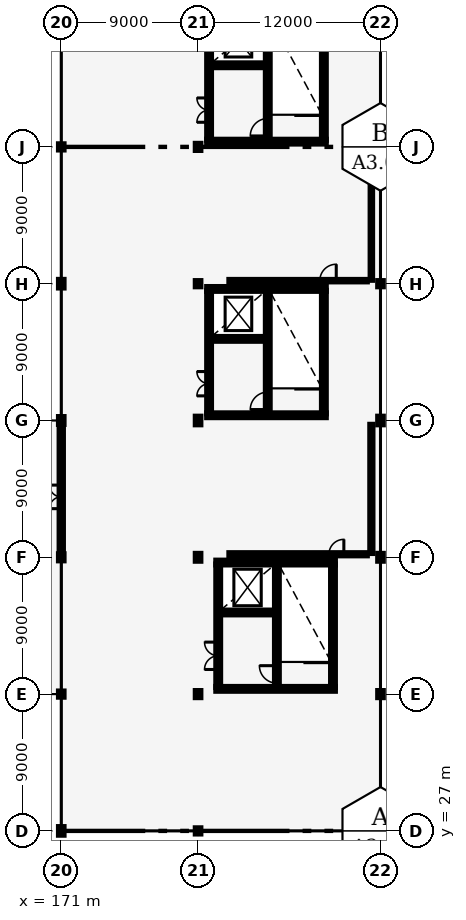
"""IFC4 building model, lengths in metres.
Left out: names, types, materials, properties, quantities, classifications, styles, units other than length and angle.
Written with IfcOpenShell. Run it as: python <this file> out.ifc"""

import sys

from ifc_helpers import new_model, si_unit, direction, frame, frame_2d, origin, origin_2d, place, context, subcontext, project, spatial, rectangle, i_section, extrude, element, fill, save


model = new_model("IFC4")
c1 = context("Model", 3, precision=1e-05, world=origin(), true_north=direction((0.0, 1.0)))
c2 = subcontext(c1, "Body", "Model", "MODEL_VIEW")
j1 = project(units=[si_unit("LENGTHUNIT", "METRE"), si_unit("PLANEANGLEUNIT", "RADIAN")], contexts=[c1])
p1 = place(None, origin())
s1 = spatial("IfcSite", under=j1, at=p1, CompositionType="ELEMENT")
p2 = place(p1, origin())
s2 = spatial("IfcBuilding", under=s1, at=p2, CompositionType="ELEMENT")
p3 = place(p2, frame((0.0, 0.0, 26.8)))
s3 = spatial("IfcBuildingStorey", under=s2, at=p3, CompositionType="ELEMENT", Elevation=26.8)
p4 = place(p3, frame((171.0, 27.0, 0.0), z_axis=(0.0, 0.0, 1.0), x_axis=(1.0, 0.0, 0.0)))
e1 = element("IfcColumn", 1, at=p4, inside=s3, PredefinedType="COLUMN", context=c2, shape_type="SweptSolid", body=[
    extrude(i_section(OverallWidth=0.3, OverallDepth=0.5, WebThickness=0.014, FlangeThickness=0.028, FilletRadius=0.027, at=origin_2d()), origin(), (0.0, 0.0, 1.0), 3.0),
])
p5 = place(p3, frame((171.0, 36.0, 0.0), z_axis=(0.0, 0.0, 1.0), x_axis=(1.0, 0.0, 0.0)))
e2 = element("IfcColumn", 2, at=p5, inside=s3, PredefinedType="COLUMN", context=c2, shape_type="SweptSolid", body=[
    extrude(i_section(OverallWidth=0.3, OverallDepth=0.34, WebThickness=0.012, FlangeThickness=0.021, FilletRadius=0.027, at=origin_2d()), origin(), (0.0, 0.0, 1.0), 3.0),
])
p6 = place(p3, frame((171.0, 45.0, 0.0), z_axis=(0.0, 0.0, 1.0), x_axis=(1.0, 0.0, 0.0)))
e3 = element("IfcColumn", 3, at=p6, inside=s3, PredefinedType="COLUMN", context=c2, shape_type="SweptSolid", body=[
    extrude(i_section(OverallWidth=0.3, OverallDepth=0.4, WebThickness=0.013, FlangeThickness=0.024, FilletRadius=0.027, at=origin_2d()), origin(), (0.0, 0.0, 1.0), 3.0),
])
p7 = place(p3, frame((171.0, 54.0, 0.0), z_axis=(0.0, 0.0, 1.0), x_axis=(1.0, 0.0, 0.0)))
e4 = element("IfcColumn", 4, at=p7, inside=s3, PredefinedType="COLUMN", context=c2, shape_type="SweptSolid", body=[
    extrude(i_section(OverallWidth=0.3, OverallDepth=0.45, WebThickness=0.014, FlangeThickness=0.026, FilletRadius=0.027, at=origin_2d()), origin(), (0.0, 0.0, 1.0), 3.0),
])
p8 = place(p3, frame((171.0, 63.0, 0.0), z_axis=(0.0, 0.0, 1.0), x_axis=(1.0, 0.0, 0.0)))
e5 = element("IfcColumn", 5, at=p8, inside=s3, PredefinedType="COLUMN", context=c2, shape_type="SweptSolid", body=[
    extrude(i_section(OverallWidth=0.3, OverallDepth=0.5, WebThickness=0.014, FlangeThickness=0.028, FilletRadius=0.027, at=origin_2d()), origin(), (0.0, 0.0, 1.0), 3.0),
])
for number, where, z_axis, x_axis in (
    (6, (171.0, 72.0, 0.0), (0.0, 0.0, 1.0), (1.0, 0.0, 0.0)),
    (7, (180.0, 27.0, 0.0), (0.0, 0.0, 1.0), (1.0, 0.0, 0.0)),
):
    element("IfcColumn", number, at=place(p3, frame(where, z_axis=z_axis, x_axis=x_axis)), inside=s3, PredefinedType="COLUMN", context=c2, shape_type="SweptSolid", body=[
        extrude(i_section(OverallWidth=0.3, OverallDepth=0.34, WebThickness=0.012, FlangeThickness=0.021, FilletRadius=0.027, at=origin_2d()), origin(), (0.0, 0.0, 1.0), 3.0),
    ])
p9 = place(p3, frame((180.0, 36.0, 0.0), z_axis=(0.0, 0.0, 1.0), x_axis=(1.0, 0.0, 0.0)))
e8 = element("IfcColumn", 8, at=p9, inside=s3, PredefinedType="COLUMN", context=c2, shape_type="SweptSolid", body=[
    extrude(i_section(OverallWidth=0.3, OverallDepth=0.4, WebThickness=0.013, FlangeThickness=0.024, FilletRadius=0.027, at=origin_2d()), origin(), (0.0, 0.0, 1.0), 3.0),
])
p10 = place(p3, frame((180.0, 45.0, 0.0), z_axis=(0.0, 0.0, 1.0), x_axis=(1.0, 0.0, 0.0)))
e9 = element("IfcColumn", 9, at=p10, inside=s3, PredefinedType="COLUMN", context=c2, shape_type="SweptSolid", body=[
    extrude(i_section(OverallWidth=0.3, OverallDepth=0.45, WebThickness=0.014, FlangeThickness=0.026, FilletRadius=0.027, at=origin_2d()), origin(), (0.0, 0.0, 1.0), 3.0),
])
p11 = place(p3, frame((180.0, 54.0, 0.0), z_axis=(0.0, 0.0, 1.0), x_axis=(1.0, 0.0, 0.0)))
e10 = element("IfcColumn", 10, at=p11, inside=s3, PredefinedType="COLUMN", context=c2, shape_type="SweptSolid", body=[
    extrude(i_section(OverallWidth=0.3, OverallDepth=0.5, WebThickness=0.014, FlangeThickness=0.028, FilletRadius=0.027, at=origin_2d()), origin(), (0.0, 0.0, 1.0), 3.0),
])
p12 = place(p3, frame((180.0, 63.0, 0.0), z_axis=(0.0, 0.0, 1.0), x_axis=(1.0, 0.0, 0.0)))
e11 = element("IfcColumn", 11, at=p12, inside=s3, PredefinedType="COLUMN", context=c2, shape_type="SweptSolid", body=[
    extrude(i_section(OverallWidth=0.3, OverallDepth=0.34, WebThickness=0.012, FlangeThickness=0.021, FilletRadius=0.027, at=origin_2d()), origin(), (0.0, 0.0, 1.0), 3.0),
])
p13 = place(p3, frame((180.0, 72.0, 0.0), z_axis=(0.0, 0.0, 1.0), x_axis=(1.0, 0.0, 0.0)))
e12 = element("IfcColumn", 12, at=p13, inside=s3, PredefinedType="COLUMN", context=c2, shape_type="SweptSolid", body=[
    extrude(i_section(OverallWidth=0.3, OverallDepth=0.4, WebThickness=0.013, FlangeThickness=0.024, FilletRadius=0.027, at=origin_2d()), origin(), (0.0, 0.0, 1.0), 3.0),
])
p14 = place(p3, frame((192.0, 27.0, 0.0), z_axis=(0.0, 0.0, 1.0), x_axis=(1.0, 0.0, 0.0)))
e13 = element("IfcColumn", 13, at=p14, inside=s3, PredefinedType="COLUMN", context=c2, shape_type="SweptSolid", body=[
    extrude(i_section(OverallWidth=0.3, OverallDepth=0.34, WebThickness=0.012, FlangeThickness=0.021, FilletRadius=0.027, at=origin_2d()), origin(), (0.0, 0.0, 1.0), 3.0),
])
p15 = place(p3, frame((192.0, 36.0, 0.0), z_axis=(0.0, 0.0, 1.0), x_axis=(1.0, 0.0, 0.0)))
e14 = element("IfcColumn", 14, at=p15, inside=s3, PredefinedType="COLUMN", context=c2, shape_type="SweptSolid", body=[
    extrude(i_section(OverallWidth=0.3, OverallDepth=0.4, WebThickness=0.013, FlangeThickness=0.024, FilletRadius=0.027, at=origin_2d()), origin(), (0.0, 0.0, 1.0), 3.0),
])
p16 = place(p3, frame((192.0, 45.0, 0.0), z_axis=(0.0, 0.0, 1.0), x_axis=(1.0, 0.0, 0.0)))
e15 = element("IfcColumn", 15, at=p16, inside=s3, PredefinedType="COLUMN", context=c2, shape_type="SweptSolid", body=[
    extrude(i_section(OverallWidth=0.3, OverallDepth=0.45, WebThickness=0.014, FlangeThickness=0.026, FilletRadius=0.027, at=origin_2d()), origin(), (0.0, 0.0, 1.0), 3.0),
])
p17 = place(p3, frame((192.0, 54.0, 0.0), z_axis=(0.0, 0.0, 1.0), x_axis=(1.0, 0.0, 0.0)))
e16 = element("IfcColumn", 16, at=p17, inside=s3, PredefinedType="COLUMN", context=c2, shape_type="SweptSolid", body=[
    extrude(i_section(OverallWidth=0.3, OverallDepth=0.5, WebThickness=0.014, FlangeThickness=0.028, FilletRadius=0.027, at=origin_2d()), origin(), (0.0, 0.0, 1.0), 3.0),
])
p18 = place(p3, frame((192.0, 63.0, 0.0), z_axis=(0.0, 0.0, 1.0), x_axis=(1.0, 0.0, 0.0)))
e17 = element("IfcColumn", 17, at=p18, inside=s3, PredefinedType="COLUMN", context=c2, shape_type="SweptSolid", body=[
    extrude(i_section(OverallWidth=0.3, OverallDepth=0.34, WebThickness=0.012, FlangeThickness=0.021, FilletRadius=0.027, at=origin_2d()), origin(), (0.0, 0.0, 1.0), 3.0),
])
p19 = place(p3, frame((192.0, 72.0, 0.0), z_axis=(0.0, 0.0, 1.0), x_axis=(1.0, 0.0, 0.0)))
e18 = element("IfcColumn", 18, at=p19, inside=s3, PredefinedType="COLUMN", context=c2, shape_type="SweptSolid", body=[
    extrude(i_section(OverallWidth=0.3, OverallDepth=0.4, WebThickness=0.013, FlangeThickness=0.024, FilletRadius=0.027, at=origin_2d()), origin(), (0.0, 0.0, 1.0), 3.0),
])
p20 = place(p3, frame((171.0, 45.195, 0.0), z_axis=(0.0, 0.0, 1.0), x_axis=(0.0, 1.0, 0.0)))
e19 = element("IfcWall", 19, at=p20, inside=s3, PredefinedType="SOLIDWALL", context=c2, shape_type="SweptSolid", body=[
    extrude(rectangle(XDim=8.585, YDim=0.215, at=frame_2d((4.292, 0.0))), origin(), (0.0, 0.0, 1.0), 2.35),
])
p21 = place(p20, frame((3.005, 0.0, 0.0)))
e20 = element("IfcOpeningElement", 20, at=p21, cuts=e19, PredefinedType="OPENING", context=c2, shape_type="SweptSolid", body=[
    extrude(rectangle(XDim=1.55, YDim=2.15, at=frame_2d((0.775, 1.075))), frame((0.0, 0.117, 0.0), z_axis=(0.0, -1.0, 0.0), x_axis=(1.0, 0.0, 0.0)), (0.0, 0.0, 1.0), 0.235),
])
p22 = place(p3, frame((180.725, 54.47, 0.0), z_axis=(0.0, 0.0, 1.0), x_axis=(0.0, 1.0, 0.0)))
e21 = element("IfcWall", 21, at=p22, inside=s3, PredefinedType="SHEAR", context=c2, shape_type="SweptSolid", body=[
    extrude(rectangle(XDim=8.06, YDim=0.25, at=frame_2d((4.03, 0.0))), origin(), (0.0, 0.0, 1.0), 2.64),
])
p23 = place(p22, frame((1.15, 0.0, 0.0)))
e22 = element("IfcOpeningElement", 22, at=p23, cuts=e21, PredefinedType="OPENING", context=c2, shape_type="SweptSolid", body=[
    extrude(rectangle(XDim=1.6, YDim=2.2, at=frame_2d((0.8, 1.1))), frame((0.0, 0.135, 0.0), z_axis=(0.0, -1.0, 0.0), x_axis=(1.0, 0.0, 0.0)), (0.0, 0.0, 1.0), 0.27),
])
p24 = place(p3, frame((188.275, 54.47, 0.0), z_axis=(0.0, 0.0, 1.0), x_axis=(0.0, 1.0, 0.0)))
e23 = element("IfcWall", 23, at=p24, inside=s3, PredefinedType="SHEAR", context=c2, shape_type="SweptSolid", body=[
    extrude(rectangle(XDim=8.06, YDim=0.25, at=frame_2d((4.03, 0.0))), origin(), (0.0, 0.0, 1.0), 2.64),
])
for number, where, z_axis, x_axis in (
    (24, (180.6, 54.345, 0.0), (0.0, 0.0, 1.0), (1.0, 0.0, 0.0)),
    (25, (180.6, 62.655, 0.0), (0.0, 0.0, 1.0), (1.0, 0.0, 0.0)),
):
    element("IfcWall", number, at=place(p3, frame(where, z_axis=z_axis, x_axis=x_axis)), inside=s3, PredefinedType="SHEAR", context=c2, shape_type="SweptSolid", body=[
        extrude(rectangle(XDim=7.8, YDim=0.25, at=frame_2d((3.9, 0.0))), origin(), (0.0, 0.0, 1.0), 2.64),
    ])
p25 = place(p3, frame((184.585, 54.47, 0.0), z_axis=(0.0, 0.0, 1.0), x_axis=(0.0, 1.0, 0.0)))
e26 = element("IfcWall", 26, at=p25, inside=s3, PredefinedType="SHEAR", context=c2, shape_type="SweptSolid", body=[
    extrude(rectangle(XDim=8.06, YDim=0.25, at=frame_2d((4.03, 0.0))), origin(), (0.0, 0.0, 1.0), 2.64),
])
p26 = place(p25, frame((0.25, 0.0, 0.0)))
e27 = element("IfcOpeningElement", 27, at=p26, cuts=e26, PredefinedType="OPENING", context=c2, shape_type="SweptSolid", body=[
    extrude(rectangle(XDim=1.15, YDim=2.15, at=frame_2d((0.575, 1.075))), frame((0.0, 0.135, 0.0), z_axis=(0.0, -1.0, 0.0), x_axis=(1.0, 0.0, 0.0)), (0.0, 0.0, 1.0), 0.27),
])
p27 = place(p3, frame((180.85, 59.37, 0.0), z_axis=(0.0, 0.0, 1.0), x_axis=(1.0, 0.0, 0.0)))
e28 = element("IfcWall", 28, at=p27, inside=s3, PredefinedType="SHEAR", context=c2, shape_type="SweptSolid", body=[
    extrude(rectangle(XDim=3.61, YDim=0.25, at=frame_2d((1.805, 0.0))), origin(), (0.0, 0.0, 1.0), 2.64),
])
p28 = place(p27, frame((1.0, 0.0, 0.0)))
e29 = element("IfcOpeningElement", 29, at=p28, cuts=e28, PredefinedType="OPENING", context=c2, shape_type="SweptSolid", body=[
    extrude(rectangle(XDim=1.1, YDim=2.1, at=frame_2d((0.55, 1.05))), frame((0.0, 0.135, 0.0), z_axis=(0.0, -1.0, 0.0), x_axis=(1.0, 0.0, 0.0)), (0.0, 0.0, 1.0), 0.27),
])
p29 = place(p3, frame((181.325, 36.47, 0.0), z_axis=(0.0, 0.0, 1.0), x_axis=(0.0, 1.0, 0.0)))
e30 = element("IfcWall", 30, at=p29, inside=s3, PredefinedType="SHEAR", context=c2, shape_type="SweptSolid", body=[
    extrude(rectangle(XDim=8.06, YDim=0.25, at=frame_2d((4.03, 0.0))), origin(), (0.0, 0.0, 1.0), 2.64),
])
p30 = place(p29, frame((1.15, 0.0, 0.0)))
e31 = element("IfcOpeningElement", 31, at=p30, cuts=e30, PredefinedType="OPENING", context=c2, shape_type="SweptSolid", body=[
    extrude(rectangle(XDim=1.8, YDim=2.2, at=frame_2d((0.9, 1.1))), frame((0.0, 0.135, 0.0), z_axis=(0.0, -1.0, 0.0), x_axis=(1.0, 0.0, 0.0)), (0.0, 0.0, 1.0), 0.27),
])
p31 = place(p3, frame((188.875, 36.47, 0.0), z_axis=(0.0, 0.0, 1.0), x_axis=(0.0, 1.0, 0.0)))
e32 = element("IfcWall", 32, at=p31, inside=s3, PredefinedType="SHEAR", context=c2, shape_type="SweptSolid", body=[
    extrude(rectangle(XDim=8.06, YDim=0.25, at=frame_2d((4.03, 0.0))), origin(), (0.0, 0.0, 1.0), 2.64),
])
for number, where, z_axis, x_axis in (
    (33, (181.2, 36.345, 0.0), (0.0, 0.0, 1.0), (1.0, 0.0, 0.0)),
    (34, (181.2, 44.655, 0.0), (0.0, 0.0, 1.0), (1.0, 0.0, 0.0)),
):
    element("IfcWall", number, at=place(p3, frame(where, z_axis=z_axis, x_axis=x_axis)), inside=s3, PredefinedType="SHEAR", context=c2, shape_type="SweptSolid", body=[
        extrude(rectangle(XDim=7.8, YDim=0.25, at=frame_2d((3.9, 0.0))), origin(), (0.0, 0.0, 1.0), 2.64),
    ])
p32 = place(p3, frame((185.185, 36.47, 0.0), z_axis=(0.0, 0.0, 1.0), x_axis=(0.0, 1.0, 0.0)))
e35 = element("IfcWall", 35, at=p32, inside=s3, PredefinedType="SHEAR", context=c2, shape_type="SweptSolid", body=[
    extrude(rectangle(XDim=8.06, YDim=0.25, at=frame_2d((4.03, 0.0))), origin(), (0.0, 0.0, 1.0), 2.64),
])
p33 = place(p32, frame((0.25, 0.0, 0.0)))
e36 = element("IfcOpeningElement", 36, at=p33, cuts=e35, PredefinedType="OPENING", context=c2, shape_type="SweptSolid", body=[
    extrude(rectangle(XDim=1.15, YDim=2.15, at=frame_2d((0.575, 1.075))), frame((0.0, 0.135, 0.0), z_axis=(0.0, -1.0, 0.0), x_axis=(1.0, 0.0, 0.0)), (0.0, 0.0, 1.0), 0.27),
])
p34 = place(p3, frame((181.45, 41.37, 0.0), z_axis=(0.0, 0.0, 1.0), x_axis=(1.0, 0.0, 0.0)))
e37 = element("IfcWall", 37, at=p34, inside=s3, PredefinedType="SHEAR", context=c2, shape_type="SweptSolid", body=[
    extrude(rectangle(XDim=3.61, YDim=0.25, at=frame_2d((1.805, 0.0))), origin(), (0.0, 0.0, 1.0), 2.64),
])
p35 = place(p34, frame((1.0, 0.0, 0.0)))
e38 = element("IfcOpeningElement", 38, at=p35, cuts=e37, PredefinedType="OPENING", context=c2, shape_type="SweptSolid", body=[
    extrude(rectangle(XDim=1.1, YDim=2.1, at=frame_2d((0.55, 1.05))), frame((0.0, 0.135, 0.0), z_axis=(0.0, -1.0, 0.0), x_axis=(1.0, 0.0, 0.0)), (0.0, 0.0, 1.0), 0.27),
])
p36 = place(p3, frame((180.725, 72.47, 0.0), z_axis=(0.0, 0.0, 1.0), x_axis=(0.0, 1.0, 0.0)))
e39 = element("IfcWall", 39, at=p36, inside=s3, PredefinedType="SHEAR", context=c2, shape_type="SweptSolid", body=[
    extrude(rectangle(XDim=8.06, YDim=0.25, at=frame_2d((4.03, 0.0))), origin(), (0.0, 0.0, 1.0), 2.64),
])
p37 = place(p36, frame((1.15, 0.0, 0.0)))
e40 = element("IfcOpeningElement", 40, at=p37, cuts=e39, PredefinedType="OPENING", context=c2, shape_type="SweptSolid", body=[
    extrude(rectangle(XDim=1.6, YDim=2.2, at=frame_2d((0.8, 1.1))), frame((0.0, 0.135, 0.0), z_axis=(0.0, -1.0, 0.0), x_axis=(1.0, 0.0, 0.0)), (0.0, 0.0, 1.0), 0.27),
])
p38 = place(p3, frame((188.275, 72.47, 0.0), z_axis=(0.0, 0.0, 1.0), x_axis=(0.0, 1.0, 0.0)))
e41 = element("IfcWall", 41, at=p38, inside=s3, PredefinedType="SHEAR", context=c2, shape_type="SweptSolid", body=[
    extrude(rectangle(XDim=8.06, YDim=0.25, at=frame_2d((4.03, 0.0))), origin(), (0.0, 0.0, 1.0), 2.64),
])
p39 = place(p3, frame((180.6, 72.345, 0.0), z_axis=(0.0, 0.0, 1.0), x_axis=(1.0, 0.0, 0.0)))
e42 = element("IfcWall", 42, at=p39, inside=s3, PredefinedType="SHEAR", context=c2, shape_type="SweptSolid", body=[
    extrude(rectangle(XDim=7.8, YDim=0.25, at=frame_2d((3.9, 0.0))), origin(), (0.0, 0.0, 1.0), 2.64),
])
p40 = place(p3, frame((184.585, 72.47, 0.0), z_axis=(0.0, 0.0, 1.0), x_axis=(0.0, 1.0, 0.0)))
e43 = element("IfcWall", 43, at=p40, inside=s3, PredefinedType="SHEAR", context=c2, shape_type="SweptSolid", body=[
    extrude(rectangle(XDim=8.06, YDim=0.25, at=frame_2d((4.03, 0.0))), origin(), (0.0, 0.0, 1.0), 2.64),
])
p41 = place(p40, frame((0.25, 0.0, 0.0)))
e44 = element("IfcOpeningElement", 44, at=p41, cuts=e43, PredefinedType="OPENING", context=c2, shape_type="SweptSolid", body=[
    extrude(rectangle(XDim=1.15, YDim=2.15, at=frame_2d((0.575, 1.075))), frame((0.0, 0.135, 0.0), z_axis=(0.0, -1.0, 0.0), x_axis=(1.0, 0.0, 0.0)), (0.0, 0.0, 1.0), 0.27),
])
p42 = place(p3, frame((180.85, 77.37, 0.0), z_axis=(0.0, 0.0, 1.0), x_axis=(1.0, 0.0, 0.0)))
e45 = element("IfcWall", 45, at=p42, inside=s3, PredefinedType="SHEAR", context=c2, shape_type="SweptSolid", body=[
    extrude(rectangle(XDim=3.61, YDim=0.25, at=frame_2d((1.805, 0.0))), origin(), (0.0, 0.0, 1.0), 2.64),
])
p43 = place(p42, frame((1.0, 0.0, 0.0)))
e46 = element("IfcOpeningElement", 46, at=p43, cuts=e45, PredefinedType="OPENING", context=c2, shape_type="SweptSolid", body=[
    extrude(rectangle(XDim=1.1, YDim=2.1, at=frame_2d((0.55, 1.05))), frame((0.0, 0.135, 0.0), z_axis=(0.0, -1.0, 0.0), x_axis=(1.0, 0.0, 0.0)), (0.0, 0.0, 1.0), 0.27),
])
p44 = place(p3, frame((182.06, 63.2, 0.0), z_axis=(0.0, 0.0, 1.0), x_axis=(1.0, 0.0, 0.0)))
e47 = element("IfcWall", 47, at=p44, inside=s3, PredefinedType="PARTITIONING", context=c2, shape_type="SweptSolid", body=[
    extrude(rectangle(XDim=9.04, YDim=0.095, at=frame_2d((4.52, 0.0))), origin(), (0.0, 0.0, 1.0), 2.35),
])
p45 = place(p44, frame((5.95, 0.0, 0.0)))
e48 = element("IfcOpeningElement", 48, at=p45, cuts=e47, PredefinedType="OPENING", context=c2, shape_type="SweptSolid", body=[
    extrude(rectangle(XDim=1.08, YDim=2.18, at=frame_2d((0.54, 1.09))), frame((0.0, 0.057, 0.0), z_axis=(0.0, -1.0, 0.0), x_axis=(1.0, 0.0, 0.0)), (0.0, 0.0, 1.0), 0.115),
])
p46 = place(p3, frame((191.4, 63.257, 0.0), z_axis=(0.0, 0.0, 1.0), x_axis=(0.0, 1.0, 0.0)))
e49 = element("IfcWall", 49, at=p46, inside=s3, PredefinedType="PARTITIONING", context=c2, shape_type="SweptSolid", body=[
    extrude(rectangle(XDim=8.486, YDim=0.095, at=frame_2d((4.243, 0.0))), origin(), (0.0, 0.0, 1.0), 2.35),
])
p47 = place(p3, frame((182.06, 45.2, 0.0), z_axis=(0.0, 0.0, 1.0), x_axis=(1.0, 0.0, 0.0)))
e50 = element("IfcWall", 50, at=p47, inside=s3, PredefinedType="PARTITIONING", context=c2, shape_type="SweptSolid", body=[
    extrude(rectangle(XDim=9.04, YDim=0.14, at=frame_2d((4.52, 0.0))), origin(), (0.0, 0.0, 1.0), 2.35),
])
p48 = place(p47, frame((6.55, 0.0, 0.0)))
e51 = element("IfcOpeningElement", 51, at=p48, cuts=e50, PredefinedType="OPENING", context=c2, shape_type="SweptSolid", body=[
    extrude(rectangle(XDim=0.98, YDim=2.12, at=frame_2d((0.49, 1.06))), frame((0.0, 0.08, 0.0), z_axis=(0.0, -1.0, 0.0), x_axis=(1.0, 0.0, 0.0)), (0.0, 0.0, 1.0), 0.16),
])
p49 = place(p3, frame((191.4, 45.284, 0.0), z_axis=(0.0, 0.0, 1.0), x_axis=(0.0, 1.0, 0.0)))
e52 = element("IfcWall", 52, at=p49, inside=s3, PredefinedType="PARTITIONING", context=c2, shape_type="SweptSolid", body=[
    extrude(rectangle(XDim=8.432, YDim=0.14, at=frame_2d((4.216, 0.0))), origin(), (0.0, 0.0, 1.0), 2.35),
])
p50 = place(p21, origin())
e53 = element("IfcDoor", 53, at=p50, inside=s3, OperationType="DOUBLE_DOOR_SINGLE_SWING", PredefinedType="DOOR", context=c2, shape_type="SweptSolid", body=[
    extrude(rectangle(XDim=1.55, YDim=2.15, at=frame_2d((0.775, 1.075))), frame((0.0, 0.025, 0.0), z_axis=(0.0, -1.0, 0.0), x_axis=(1.0, 0.0, 0.0)), (0.0, 0.0, 1.0), 0.05),
])
fill(e20, e53)
p51 = place(p26, origin())
e54 = element("IfcDoor", 54, at=p51, inside=s3, OperationType="SINGLE_SWING_LEFT", PredefinedType="DOOR", context=c2, shape_type="SweptSolid", body=[
    extrude(rectangle(XDim=1.15, YDim=2.15, at=frame_2d((0.575, 1.075))), frame((0.0, 0.025, 0.0), z_axis=(0.0, -1.0, 0.0), x_axis=(1.0, 0.0, 0.0)), (0.0, 0.0, 1.0), 0.05),
])
fill(e27, e54)
p52 = place(p28, origin())
e55 = element("IfcDoor", 55, at=p52, inside=s3, OperationType="DOUBLE_DOOR_SLIDING", PredefinedType="DOOR", context=c2, shape_type="SweptSolid", body=[
    extrude(rectangle(XDim=1.1, YDim=2.1, at=frame_2d((0.55, 1.05))), frame((0.0, 0.025, 0.0), z_axis=(0.0, -1.0, 0.0), x_axis=(1.0, 0.0, 0.0)), (0.0, 0.0, 1.0), 0.05),
])
fill(e29, e55)
p53 = place(p23, origin())
e56 = element("IfcDoor", 56, at=p53, inside=s3, OperationType="DOUBLE_DOOR_SINGLE_SWING", PredefinedType="DOOR", context=c2, shape_type="SweptSolid", body=[
    extrude(rectangle(XDim=1.6, YDim=2.2, at=frame_2d((0.8, 1.1))), frame((0.0, 0.025, 0.0), z_axis=(0.0, -1.0, 0.0), x_axis=(1.0, 0.0, 0.0)), (0.0, 0.0, 1.0), 0.05),
])
fill(e22, e56)
p54 = place(p33, origin())
e57 = element("IfcDoor", 57, at=p54, inside=s3, OperationType="SINGLE_SWING_RIGHT", PredefinedType="DOOR", context=c2, shape_type="SweptSolid", body=[
    extrude(rectangle(XDim=1.15, YDim=2.15, at=frame_2d((0.575, 1.075))), frame((0.0, 0.025, 0.0), z_axis=(0.0, -1.0, 0.0), x_axis=(1.0, 0.0, 0.0)), (0.0, 0.0, 1.0), 0.05),
])
fill(e36, e57)
p55 = place(p35, origin())
e58 = element("IfcDoor", 58, at=p55, inside=s3, OperationType="DOUBLE_DOOR_SLIDING", PredefinedType="DOOR", context=c2, shape_type="SweptSolid", body=[
    extrude(rectangle(XDim=1.1, YDim=2.1, at=frame_2d((0.55, 1.05))), frame((0.0, 0.025, 0.0), z_axis=(0.0, -1.0, 0.0), x_axis=(1.0, 0.0, 0.0)), (0.0, 0.0, 1.0), 0.05),
])
fill(e38, e58)
p56 = place(p30, origin())
e59 = element("IfcDoor", 59, at=p56, inside=s3, OperationType="DOUBLE_DOOR_SINGLE_SWING", PredefinedType="DOOR", context=c2, shape_type="SweptSolid", body=[
    extrude(rectangle(XDim=1.8, YDim=2.2, at=frame_2d((0.9, 1.1))), frame((0.0, 0.025, 0.0), z_axis=(0.0, -1.0, 0.0), x_axis=(1.0, 0.0, 0.0)), (0.0, 0.0, 1.0), 0.05),
])
fill(e31, e59)
p57 = place(p41, origin())
e60 = element("IfcDoor", 60, at=p57, inside=s3, OperationType="SINGLE_SWING_LEFT", PredefinedType="DOOR", context=c2, shape_type="SweptSolid", body=[
    extrude(rectangle(XDim=1.15, YDim=2.15, at=frame_2d((0.575, 1.075))), frame((0.0, 0.025, 0.0), z_axis=(0.0, -1.0, 0.0), x_axis=(1.0, 0.0, 0.0)), (0.0, 0.0, 1.0), 0.05),
])
fill(e44, e60)
p58 = place(p43, origin())
e61 = element("IfcDoor", 61, at=p58, inside=s3, OperationType="DOUBLE_DOOR_SLIDING", PredefinedType="DOOR", context=c2, shape_type="SweptSolid", body=[
    extrude(rectangle(XDim=1.1, YDim=2.1, at=frame_2d((0.55, 1.05))), frame((0.0, 0.025, 0.0), z_axis=(0.0, -1.0, 0.0), x_axis=(1.0, 0.0, 0.0)), (0.0, 0.0, 1.0), 0.05),
])
fill(e46, e61)
p59 = place(p37, origin())
e62 = element("IfcDoor", 62, at=p59, inside=s3, OperationType="DOUBLE_DOOR_SINGLE_SWING", PredefinedType="DOOR", context=c2, shape_type="SweptSolid", body=[
    extrude(rectangle(XDim=1.6, YDim=2.2, at=frame_2d((0.8, 1.1))), frame((0.0, 0.025, 0.0), z_axis=(0.0, -1.0, 0.0), x_axis=(1.0, 0.0, 0.0)), (0.0, 0.0, 1.0), 0.05),
])
fill(e40, e62)
p60 = place(p45, origin())
e63 = element("IfcDoor", 63, at=p60, inside=s3, OperationType="SINGLE_SWING_RIGHT", PredefinedType="DOOR", context=c2, shape_type="SweptSolid", body=[
    extrude(rectangle(XDim=1.08, YDim=2.18, at=frame_2d((0.54, 1.09))), frame((0.0, 0.025, 0.0), z_axis=(0.0, -1.0, 0.0), x_axis=(1.0, 0.0, 0.0)), (0.0, 0.0, 1.0), 0.05),
])
fill(e48, e63)
p61 = place(p48, origin())
e64 = element("IfcDoor", 64, at=p61, inside=s3, OperationType="SINGLE_SWING_RIGHT", PredefinedType="DOOR", context=c2, shape_type="SweptSolid", body=[
    extrude(rectangle(XDim=0.98, YDim=2.12, at=frame_2d((0.49, 1.06))), frame((0.0, 0.025, 0.0), z_axis=(0.0, -1.0, 0.0), x_axis=(1.0, 0.0, 0.0)), (0.0, 0.0, 1.0), 0.05),
])
fill(e51, e64)
save(model, sys.argv[1])
